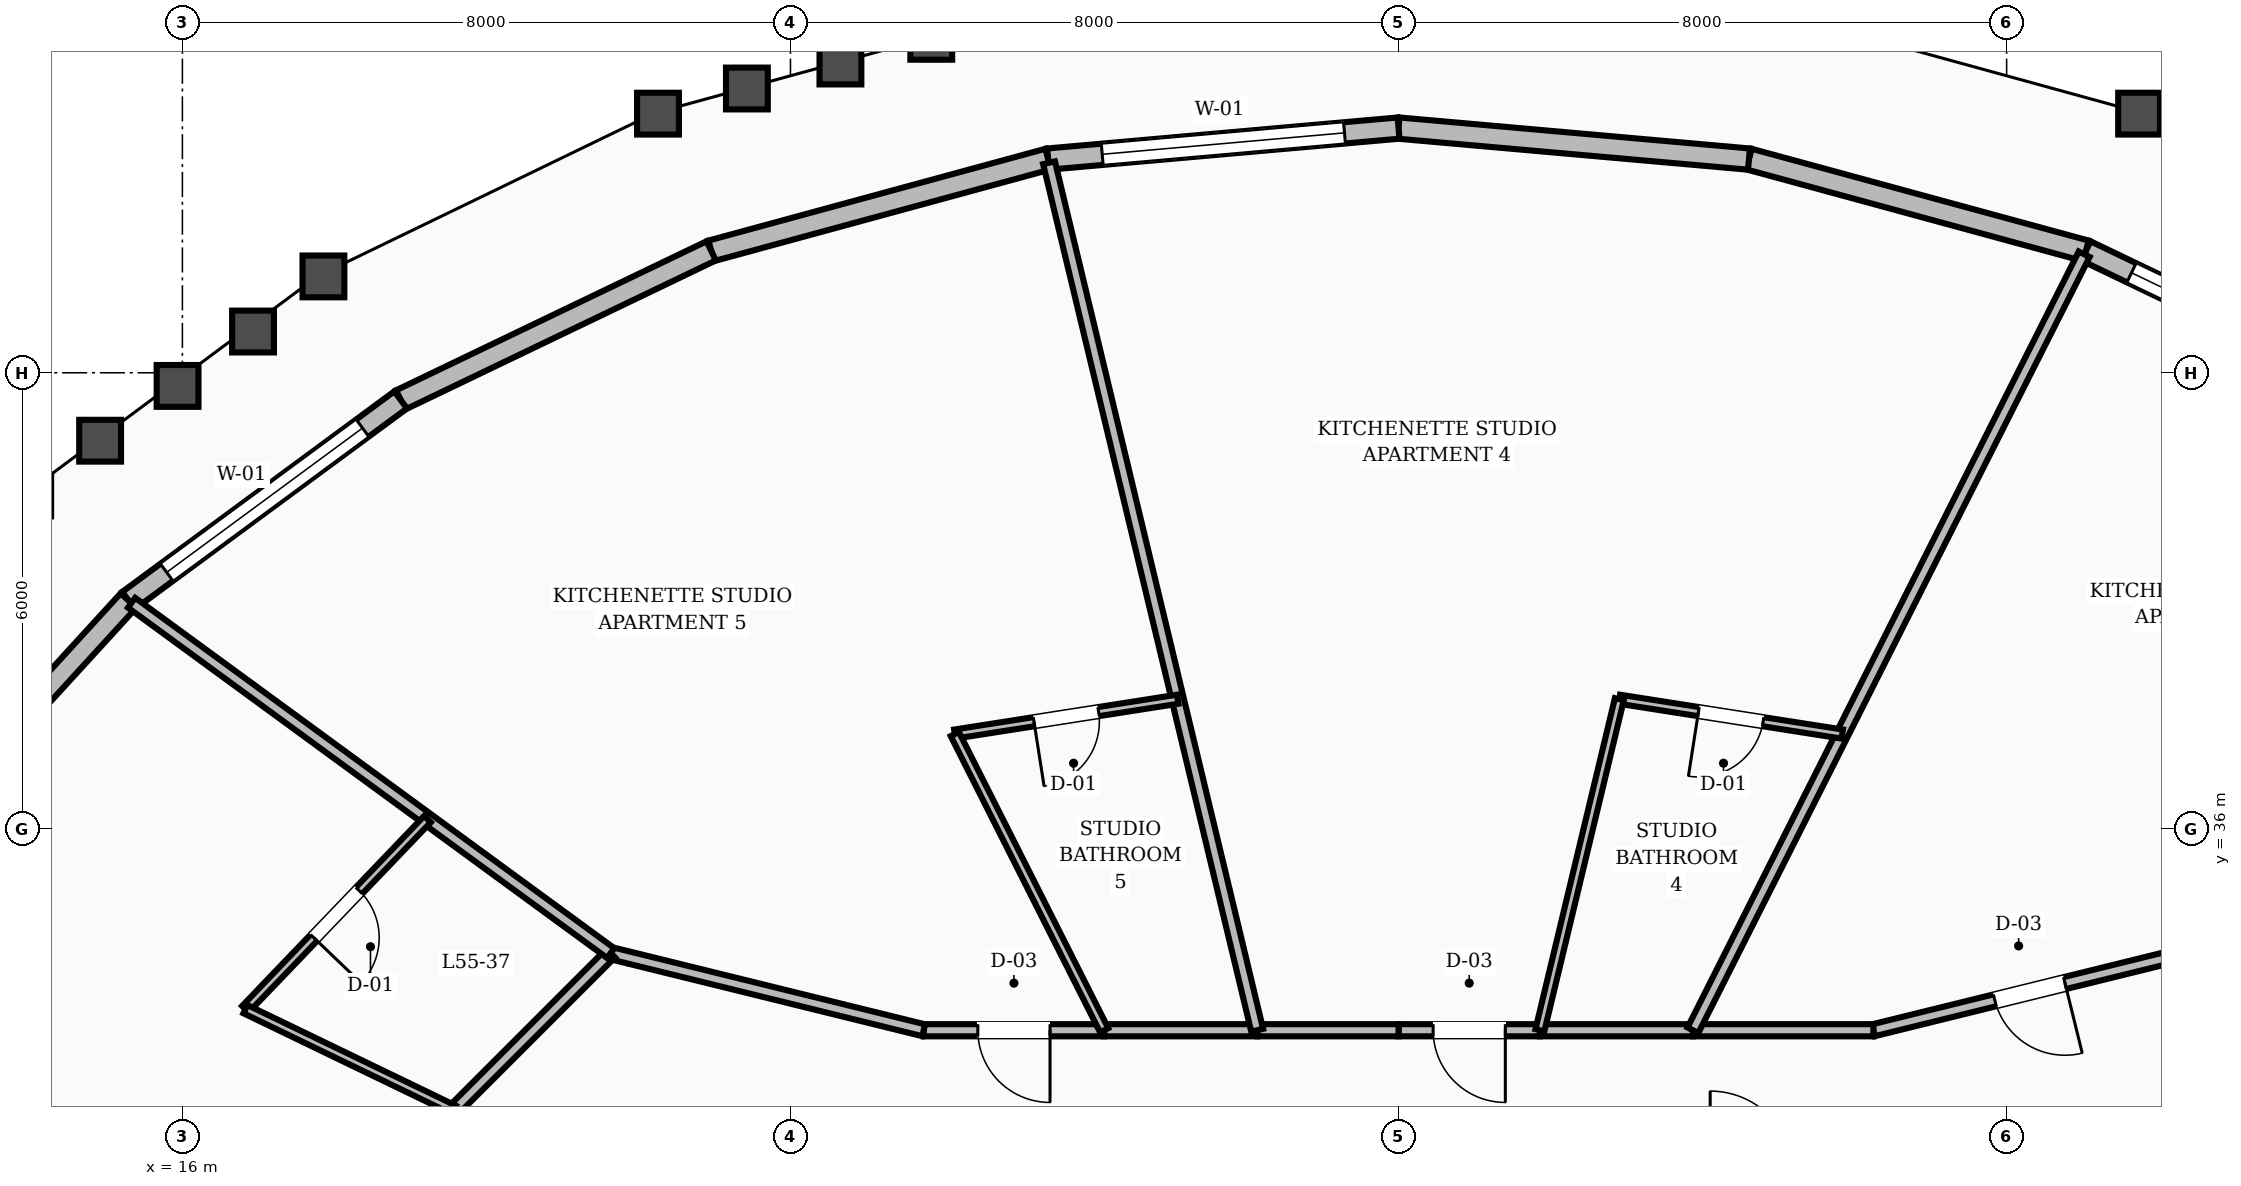
"""IFC4 building model, lengths in metres.
Left out: names, types, materials, properties, quantities, classifications, styles, units other than length and angle.
Written with IfcOpenShell. Run it as: python <this file> out.ifc"""

import sys

from ifc_helpers import new_model, si_unit, direction, frame, frame_2d, origin, place, context, subcontext, project, spatial, rectangle, extrude, element, fill, save


model = new_model("IFC4")
c1 = context("Model", 3, precision=1e-05, world=origin(), true_north=direction((0.0, 1.0)))
c2 = subcontext(c1, "Body", "Model", "MODEL_VIEW")
j1 = project(units=[si_unit("LENGTHUNIT", "METRE"), si_unit("PLANEANGLEUNIT", "RADIAN")], contexts=[c1])
p1 = place(None, origin())
s1 = spatial("IfcSite", under=j1, at=p1, CompositionType="ELEMENT")
p2 = place(p1, origin())
s2 = spatial("IfcBuilding", under=s1, at=p2, CompositionType="ELEMENT")
p3 = place(p2, frame((0.0, 0.0, 214.8)))
s3 = spatial("IfcBuildingStorey", under=s2, at=p3, CompositionType="ELEMENT", Elevation=214.8)
p4 = place(p3, frame((45.128, 41.643, 0.0), z_axis=(0.0, 0.0, 1.0), x_axis=(-0.90155079899, 0.432673267999, 0.0)))
e1 = element("IfcWall", 1, at=p4, inside=s3, PredefinedType="STANDARD", context=c2, shape_type="SweptSolid", body=[
    extrude(rectangle(XDim=4.531, YDim=0.28, at=frame_2d((2.266, 0.0))), origin(), (0.0, 0.0, 1.0), 2.88),
])
p5 = place(p4, frame((0.666, 0.0, 0.8)))
e2 = element("IfcOpeningElement", 2, at=p5, cuts=e1, PredefinedType="OPENING", context=c2, shape_type="SweptSolid", body=[
    extrude(rectangle(XDim=3.2, YDim=1.65, at=frame_2d((1.6, 0.825))), frame((0.0, 0.15, 0.0), z_axis=(0.0, -1.0, 0.0), x_axis=(1.0, 0.0, 0.0)), (0.0, 0.0, 1.0), 0.3),
])
p6 = place(p3, frame((41.043, 43.604, 0.0), z_axis=(0.0, 0.0, 1.0), x_axis=(-0.964839814396, 0.26283860553, 0.0)))
e3 = element("IfcWall", 3, at=p6, inside=s3, PredefinedType="STANDARD", context=c2, shape_type="SweptSolid", body=[
    extrude(rectangle(XDim=4.594, YDim=0.28, at=frame_2d((2.297, 0.0))), origin(), (0.0, 0.0, 1.0), 2.88),
])
p7 = place(p3, frame((36.61, 44.811, 0.0), z_axis=(0.0, 0.0, 1.0), x_axis=(-0.99611203437, 0.088095487867, 0.0)))
e4 = element("IfcWall", 4, at=p7, inside=s3, PredefinedType="STANDARD", context=c2, shape_type="SweptSolid", body=[
    extrude(rectangle(XDim=4.628, YDim=0.28, at=frame_2d((2.314, 0.0))), origin(), (0.0, 0.0, 1.0), 2.88),
])
p8 = place(p3, frame((32.0, 45.219, 0.0), z_axis=(0.0, 0.0, 1.0), x_axis=(-0.99611203437, -0.088095487867, 0.0)))
e5 = element("IfcWall", 5, at=p8, inside=s3, PredefinedType="STANDARD", context=c2, shape_type="SweptSolid", body=[
    extrude(rectangle(XDim=4.628, YDim=0.28, at=frame_2d((2.314, 0.0))), origin(), (0.0, 0.0, 1.0), 2.88),
])
p9 = place(p8, frame((0.714, 0.0, 0.8)))
e6 = element("IfcOpeningElement", 6, at=p9, cuts=e5, PredefinedType="OPENING", context=c2, shape_type="SweptSolid", body=[
    extrude(rectangle(XDim=3.2, YDim=1.65, at=frame_2d((1.6, 0.825))), frame((0.0, 0.15, 0.0), z_axis=(0.0, -1.0, 0.0), x_axis=(1.0, 0.0, 0.0)), (0.0, 0.0, 1.0), 0.3),
])
p10 = place(p3, frame((27.39, 44.811, 0.0), z_axis=(0.0, 0.0, 1.0), x_axis=(-0.964839814396, -0.26283860553, 0.0)))
e7 = element("IfcWall", 7, at=p10, inside=s3, PredefinedType="STANDARD", context=c2, shape_type="SweptSolid", body=[
    extrude(rectangle(XDim=4.594, YDim=0.28, at=frame_2d((2.297, 0.0))), origin(), (0.0, 0.0, 1.0), 2.88),
])
p11 = place(p3, frame((22.957, 43.604, 0.0), z_axis=(0.0, 0.0, 1.0), x_axis=(-0.90155079899, -0.432673267999, 0.0)))
e8 = element("IfcWall", 8, at=p11, inside=s3, PredefinedType="STANDARD", context=c2, shape_type="SweptSolid", body=[
    extrude(rectangle(XDim=4.531, YDim=0.28, at=frame_2d((2.266, 0.0))), origin(), (0.0, 0.0, 1.0), 2.88),
])
p12 = place(p3, frame((18.872, 41.643, 0.0), z_axis=(0.0, 0.0, 1.0), x_axis=(-0.8050103103, -0.593260819801, 0.0)))
e9 = element("IfcWall", 9, at=p12, inside=s3, PredefinedType="STANDARD", context=c2, shape_type="SweptSolid", body=[
    extrude(rectangle(XDim=4.448, YDim=0.28, at=frame_2d((2.224, 0.0))), origin(), (0.0, 0.0, 1.0), 2.88),
])
p13 = place(p12, frame((0.624, 0.0, 0.8)))
e10 = element("IfcOpeningElement", 10, at=p13, cuts=e9, PredefinedType="OPENING", context=c2, shape_type="SweptSolid", body=[
    extrude(rectangle(XDim=3.2, YDim=1.65, at=frame_2d((1.6, 0.825))), frame((0.0, 0.15, 0.0), z_axis=(0.0, -1.0, 0.0), x_axis=(1.0, 0.0, 0.0)), (0.0, 0.0, 1.0), 0.3),
])
p14 = place(p3, frame((15.291, 39.004, 0.0), z_axis=(0.0, 0.0, 1.0), x_axis=(-0.674642715371, -0.73814443478, 0.0)))
e11 = element("IfcWall", 11, at=p14, inside=s3, PredefinedType="STANDARD", context=c2, shape_type="SweptSolid", body=[
    extrude(rectangle(XDim=4.356, YDim=0.28, at=frame_2d((2.178, 0.0))), origin(), (0.0, 0.0, 1.0), 2.88),
])
p15 = place(p3, frame((42.365, 34.365, 0.0), z_axis=(0.0, 0.0, 1.0), x_axis=(-0.970939799552, -0.239323850978, 0.0)))
e12 = element("IfcWall", 12, at=p15, inside=s3, PredefinedType="SOLIDWALL", context=c2, shape_type="SweptSolid", body=[
    extrude(rectangle(XDim=4.241, YDim=0.16, at=frame_2d((2.12, 0.0))), origin(), (0.0, 0.0, 1.0), 2.87),
])
p16 = place(p15, frame((1.646, 0.0, 0.0)))
e13 = element("IfcOpeningElement", 13, at=p16, cuts=e12, PredefinedType="OPENING", context=c2, shape_type="SweptSolid", body=[
    extrude(rectangle(XDim=0.95, YDim=2.1, at=frame_2d((0.475, 1.05))), frame((0.0, 0.09, 0.0), z_axis=(0.0, -1.0, 0.0), x_axis=(1.0, 0.0, 0.0)), (0.0, 0.0, 1.0), 0.18),
])
p17 = place(p3, frame((38.248, 33.35, 0.0), z_axis=(0.0, 0.0, 1.0), x_axis=(-1.0, 0.0, 0.0)))
e14 = element("IfcWall", 14, at=p17, inside=s3, PredefinedType="SOLIDWALL", context=c2, shape_type="SweptSolid", body=[
    extrude(rectangle(XDim=2.375, YDim=0.16, at=frame_2d((1.188, 0.0))), origin(), (0.0, 0.0, 1.0), 2.87),
])
p18 = place(p3, frame((35.873, 33.35, 0.0), z_axis=(0.0, 0.0, 1.0), x_axis=(-1.0, 0.0, 0.0)))
e15 = element("IfcWall", 15, at=p18, inside=s3, PredefinedType="SOLIDWALL", context=c2, shape_type="SweptSolid", body=[
    extrude(rectangle(XDim=2.013, YDim=0.16, at=frame_2d((1.006, 0.0))), origin(), (0.0, 0.0, 1.0), 2.87),
])
p19 = place(p3, frame((33.86, 33.35, 0.0), z_axis=(0.0, 0.0, 1.0), x_axis=(-1.0, 0.0, 0.0)))
e16 = element("IfcWall", 16, at=p19, inside=s3, PredefinedType="SOLIDWALL", context=c2, shape_type="SweptSolid", body=[
    extrude(rectangle(XDim=1.86, YDim=0.16, at=frame_2d((0.93, 0.0))), origin(), (0.0, 0.0, 1.0), 2.87),
])
p20 = place(p19, frame((0.455, 0.0, 0.0)))
e17 = element("IfcOpeningElement", 17, at=p20, cuts=e16, PredefinedType="OPENING", context=c2, shape_type="SweptSolid", body=[
    extrude(rectangle(XDim=0.95, YDim=2.1, at=frame_2d((0.475, 1.05))), frame((0.0, 0.09, 0.0), z_axis=(0.0, -1.0, 0.0), x_axis=(1.0, 0.0, 0.0)), (0.0, 0.0, 1.0), 0.18),
])
p21 = place(p3, frame((32.0, 33.35, 0.0), z_axis=(0.0, 0.0, 1.0), x_axis=(-1.0, 0.0, 0.0)))
e18 = element("IfcWall", 18, at=p21, inside=s3, PredefinedType="SOLIDWALL", context=c2, shape_type="SweptSolid", body=[
    extrude(rectangle(XDim=1.86, YDim=0.16, at=frame_2d((0.93, 0.0))), origin(), (0.0, 0.0, 1.0), 2.87),
])
p22 = place(p3, frame((30.14, 33.35, 0.0), z_axis=(0.0, 0.0, 1.0), x_axis=(-1.0, 0.0, 0.0)))
e19 = element("IfcWall", 19, at=p22, inside=s3, PredefinedType="SOLIDWALL", context=c2, shape_type="SweptSolid", body=[
    extrude(rectangle(XDim=2.013, YDim=0.16, at=frame_2d((1.006, 0.0))), origin(), (0.0, 0.0, 1.0), 2.87),
])
p23 = place(p3, frame((28.127, 33.35, 0.0), z_axis=(0.0, 0.0, 1.0), x_axis=(-1.0, 0.0, 0.0)))
e20 = element("IfcWall", 20, at=p23, inside=s3, PredefinedType="SOLIDWALL", context=c2, shape_type="SweptSolid", body=[
    extrude(rectangle(XDim=2.375, YDim=0.16, at=frame_2d((1.188, 0.0))), origin(), (0.0, 0.0, 1.0), 2.87),
])
p24 = place(p23, frame((0.712, 0.0, 0.0)))
e21 = element("IfcOpeningElement", 21, at=p24, cuts=e20, PredefinedType="OPENING", context=c2, shape_type="SweptSolid", body=[
    extrude(rectangle(XDim=0.95, YDim=2.1, at=frame_2d((0.475, 1.05))), frame((0.0, 0.09, 0.0), z_axis=(0.0, -1.0, 0.0), x_axis=(1.0, 0.0, 0.0)), (0.0, 0.0, 1.0), 0.18),
])
p25 = place(p3, frame((25.752, 33.35, 0.0), z_axis=(0.0, 0.0, 1.0), x_axis=(-0.970939799552, 0.239323850978, 0.0)))
e22 = element("IfcWall", 22, at=p25, inside=s3, PredefinedType="SOLIDWALL", context=c2, shape_type="SweptSolid", body=[
    extrude(rectangle(XDim=4.241, YDim=0.16, at=frame_2d((2.12, 0.0))), origin(), (0.0, 0.0, 1.0), 2.87),
])
p26 = place(p3, frame((21.635, 34.365, 0.0), z_axis=(0.0, 0.0, 1.0), x_axis=(-0.707106781187, -0.707106781187, 0.0)))
e23 = element("IfcWall", 23, at=p26, inside=s3, PredefinedType="SOLIDWALL", context=c2, shape_type="SweptSolid", body=[
    extrude(rectangle(XDim=2.916, YDim=0.16, at=frame_2d((1.458, 0.0))), origin(), (0.0, 0.0, 1.0), 2.87),
])
p27 = place(p3, frame((35.873, 33.35, 0.0), z_axis=(0.0, 0.0, 1.0), x_axis=(0.450217644686, 0.892918849848, 0.0)))
e24 = element("IfcWall", 24, at=p27, inside=s3, PredefinedType="SOLIDWALL", context=c2, shape_type="SweptSolid", body=[
    extrude(rectangle(XDim=11.433, YDim=0.16, at=frame_2d((5.717, 0.0))), origin(), (0.0, 0.0, 1.0), 2.87),
])
p28 = place(p3, frame((37.837, 37.246, 0.0), z_axis=(0.0, 0.0, 1.0), x_axis=(-0.987985360341, 0.154547493513, 0.0)))
e25 = element("IfcWall", 25, at=p28, inside=s3, PredefinedType="PARTITIONING", context=c2, shape_type="SweptSolid", body=[
    extrude(rectangle(XDim=2.968, YDim=0.12, at=frame_2d((1.484, 0.0))), origin(), (0.0, 0.0, 1.0), 2.87),
])
p29 = place(p28, frame((1.054, 0.0, 0.0)))
e26 = element("IfcOpeningElement", 26, at=p29, cuts=e25, PredefinedType="OPENING", context=c2, shape_type="SweptSolid", body=[
    extrude(rectangle(XDim=0.86, YDim=2.1, at=frame_2d((0.43, 1.05))), frame((0.0, 0.07, 0.0), z_axis=(0.0, -1.0, 0.0), x_axis=(1.0, 0.0, 0.0)), (0.0, 0.0, 1.0), 0.14),
])
p30 = place(p3, frame((33.86, 33.35, 0.0), z_axis=(0.0, 0.0, 1.0), x_axis=(0.233315222818, 0.972401155286, 0.0)))
e27 = element("IfcWall", 27, at=p30, inside=s3, PredefinedType="PARTITIONING", context=c2, shape_type="SweptSolid", body=[
    extrude(rectangle(XDim=4.479, YDim=0.12, at=frame_2d((2.239, 0.0))), origin(), (0.0, 0.0, 1.0), 2.87),
])
p31 = place(p3, frame((30.14, 33.35, 0.0), z_axis=(0.0, 0.0, 1.0), x_axis=(-0.233337547779, 0.972395798426, 0.0)))
e28 = element("IfcWall", 28, at=p31, inside=s3, PredefinedType="SOLIDWALL", context=c2, shape_type="SweptSolid", body=[
    extrude(rectangle(XDim=11.736, YDim=0.16, at=frame_2d((5.868, 0.0))), origin(), (0.0, 0.0, 1.0), 2.87),
])
p32 = place(p3, frame((29.095, 37.705, 0.0), z_axis=(0.0, 0.0, 1.0), x_axis=(-0.987985360341, -0.154547493513, 0.0)))
e29 = element("IfcWall", 29, at=p32, inside=s3, PredefinedType="PARTITIONING", context=c2, shape_type="SweptSolid", body=[
    extrude(rectangle(XDim=2.968, YDim=0.12, at=frame_2d((1.484, 0.0))), origin(), (0.0, 0.0, 1.0), 2.87),
])
p33 = place(p32, frame((1.054, 0.0, 0.0)))
e30 = element("IfcOpeningElement", 30, at=p33, cuts=e29, PredefinedType="OPENING", context=c2, shape_type="SweptSolid", body=[
    extrude(rectangle(XDim=0.86, YDim=2.1, at=frame_2d((0.43, 1.05))), frame((0.0, 0.07, 0.0), z_axis=(0.0, -1.0, 0.0), x_axis=(1.0, 0.0, 0.0)), (0.0, 0.0, 1.0), 0.14),
])
p34 = place(p3, frame((28.127, 33.35, 0.0), z_axis=(0.0, 0.0, 1.0), x_axis=(-0.450232362238, 0.892911428975, 0.0)))
e31 = element("IfcWall", 31, at=p34, inside=s3, PredefinedType="PARTITIONING", context=c2, shape_type="SweptSolid", body=[
    extrude(rectangle(XDim=4.364, YDim=0.12, at=frame_2d((2.182, 0.0))), origin(), (0.0, 0.0, 1.0), 2.87),
])
p35 = place(p3, frame((21.635, 34.365, 0.0), z_axis=(0.0, 0.0, 1.0), x_axis=(-0.807193456396, 0.5902869844, 0.0)))
e32 = element("IfcWall", 32, at=p35, inside=s3, PredefinedType="SOLIDWALL", context=c2, shape_type="SweptSolid", body=[
    extrude(rectangle(XDim=7.809, YDim=0.16, at=frame_2d((3.905, 0.0))), origin(), (0.0, 0.0, 1.0), 2.87),
])
p36 = place(p3, frame((19.224, 36.128, 0.0), z_axis=(0.0, 0.0, 1.0), x_axis=(-0.691782824038, -0.722105618567, 0.0)))
e33 = element("IfcWall", 33, at=p36, inside=s3, PredefinedType="PARTITIONING", context=c2, shape_type="SweptSolid", body=[
    extrude(rectangle(XDim=3.462, YDim=0.12, at=frame_2d((1.731, 0.0))), origin(), (0.0, 0.0, 1.0), 2.87),
])
p37 = place(p36, frame((1.301, 0.0, 0.0)))
e34 = element("IfcOpeningElement", 34, at=p37, cuts=e33, PredefinedType="OPENING", context=c2, shape_type="SweptSolid", body=[
    extrude(rectangle(XDim=0.86, YDim=2.1, at=frame_2d((0.43, 1.05))), frame((0.0, 0.07, 0.0), z_axis=(0.0, -1.0, 0.0), x_axis=(1.0, 0.0, 0.0)), (0.0, 0.0, 1.0), 0.14),
])
p38 = place(p3, frame((19.573, 32.303, 0.0), z_axis=(0.0, 0.0, 1.0), x_axis=(-0.900574352632, 0.434702007565, 0.0)))
e35 = element("IfcWall", 35, at=p38, inside=s3, PredefinedType="PARTITIONING", context=c2, shape_type="SweptSolid", body=[
    extrude(rectangle(XDim=3.047, YDim=0.12, at=frame_2d((1.523, 0.0))), origin(), (0.0, 0.0, 1.0), 2.87),
])
p39 = place(p5, origin())
e36 = element("IfcWindow", 36, at=p39, inside=s3, PartitioningType="SINGLE_PANEL", PredefinedType="WINDOW", context=c2, shape_type="SweptSolid", body=[
    extrude(rectangle(XDim=3.2, YDim=1.65, at=frame_2d((1.6, 0.825))), frame((0.0, 0.03, 0.0), z_axis=(0.0, -1.0, 0.0), x_axis=(1.0, 0.0, 0.0)), (0.0, 0.0, 1.0), 0.06),
])
fill(e2, e36)
p40 = place(p9, origin())
e37 = element("IfcWindow", 37, at=p40, inside=s3, PartitioningType="SINGLE_PANEL", PredefinedType="WINDOW", context=c2, shape_type="SweptSolid", body=[
    extrude(rectangle(XDim=3.2, YDim=1.65, at=frame_2d((1.6, 0.825))), frame((0.0, 0.03, 0.0), z_axis=(0.0, -1.0, 0.0), x_axis=(1.0, 0.0, 0.0)), (0.0, 0.0, 1.0), 0.06),
])
fill(e6, e37)
p41 = place(p13, origin())
e38 = element("IfcWindow", 38, at=p41, inside=s3, PartitioningType="SINGLE_PANEL", PredefinedType="WINDOW", context=c2, shape_type="SweptSolid", body=[
    extrude(rectangle(XDim=3.2, YDim=1.65, at=frame_2d((1.6, 0.825))), frame((0.0, 0.03, 0.0), z_axis=(0.0, -1.0, 0.0), x_axis=(1.0, 0.0, 0.0)), (0.0, 0.0, 1.0), 0.06),
])
fill(e10, e38)
p42 = place(p16, origin())
e39 = element("IfcDoor", 39, at=p42, inside=s3, OperationType="SINGLE_SWING_LEFT", PredefinedType="DOOR", context=c2, shape_type="SweptSolid", body=[
    extrude(rectangle(XDim=0.95, YDim=2.1, at=frame_2d((0.475, 1.05))), frame((0.0, 0.025, 0.0), z_axis=(0.0, -1.0, 0.0), x_axis=(1.0, 0.0, 0.0)), (0.0, 0.0, 1.0), 0.05),
])
fill(e13, e39)
p43 = place(p29, origin())
e40 = element("IfcDoor", 40, at=p43, inside=s3, OperationType="SINGLE_SWING_RIGHT", PredefinedType="DOOR", context=c2, shape_type="SweptSolid", body=[
    extrude(rectangle(XDim=0.86, YDim=2.1, at=frame_2d((0.43, 1.05))), frame((0.0, 0.025, 0.0), z_axis=(0.0, -1.0, 0.0), x_axis=(1.0, 0.0, 0.0)), (0.0, 0.0, 1.0), 0.05),
])
fill(e26, e40)
p44 = place(p20, origin())
e41 = element("IfcDoor", 41, at=p44, inside=s3, OperationType="SINGLE_SWING_LEFT", PredefinedType="DOOR", context=c2, shape_type="SweptSolid", body=[
    extrude(rectangle(XDim=0.95, YDim=2.1, at=frame_2d((0.475, 1.05))), frame((0.0, 0.025, 0.0), z_axis=(0.0, -1.0, 0.0), x_axis=(1.0, 0.0, 0.0)), (0.0, 0.0, 1.0), 0.05),
])
fill(e17, e41)
p45 = place(p33, origin())
e42 = element("IfcDoor", 42, at=p45, inside=s3, OperationType="SINGLE_SWING_RIGHT", PredefinedType="DOOR", context=c2, shape_type="SweptSolid", body=[
    extrude(rectangle(XDim=0.86, YDim=2.1, at=frame_2d((0.43, 1.05))), frame((0.0, 0.025, 0.0), z_axis=(0.0, -1.0, 0.0), x_axis=(1.0, 0.0, 0.0)), (0.0, 0.0, 1.0), 0.05),
])
fill(e30, e42)
p46 = place(p24, origin())
e43 = element("IfcDoor", 43, at=p46, inside=s3, OperationType="SINGLE_SWING_LEFT", PredefinedType="DOOR", context=c2, shape_type="SweptSolid", body=[
    extrude(rectangle(XDim=0.95, YDim=2.1, at=frame_2d((0.475, 1.05))), frame((0.0, 0.025, 0.0), z_axis=(0.0, -1.0, 0.0), x_axis=(1.0, 0.0, 0.0)), (0.0, 0.0, 1.0), 0.05),
])
fill(e21, e43)
p47 = place(p37, origin())
e44 = element("IfcDoor", 44, at=p47, inside=s3, OperationType="SINGLE_SWING_RIGHT", PredefinedType="DOOR", context=c2, shape_type="SweptSolid", body=[
    extrude(rectangle(XDim=0.86, YDim=2.1, at=frame_2d((0.43, 1.05))), frame((0.0, 0.025, 0.0), z_axis=(0.0, -1.0, 0.0), x_axis=(1.0, 0.0, 0.0)), (0.0, 0.0, 1.0), 0.05),
])
fill(e34, e44)
save(model, sys.argv[1])
